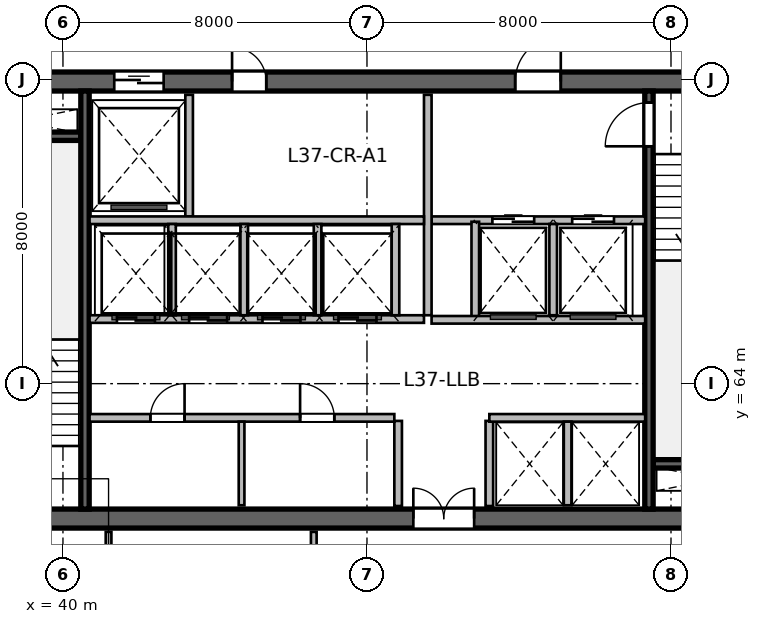
"""IFC4 building model, lengths in metres.
Left out: names, types, materials, properties, quantities, classifications, styles, units other than length and angle.
Written with IfcOpenShell. Run it as: python <this file> out.ifc"""

import sys

from ifc_helpers import new_model, si_unit, direction, frame, frame_2d, origin, place, context, subcontext, project, spatial, rectangle, extrude, source, transform, mapped, element, fill, save


model = new_model("IFC4")
c1 = context("Model", 3, precision=1e-05, world=origin(), true_north=direction((0.0, 1.0)))
c2 = subcontext(c1, "Body", "Model", "MODEL_VIEW")
j1 = project(units=[si_unit("LENGTHUNIT", "METRE"), si_unit("PLANEANGLEUNIT", "RADIAN")], contexts=[c1])
p1 = place(None, origin())
s1 = spatial("IfcSite", under=j1, at=p1, CompositionType="ELEMENT")
p2 = place(p1, origin())
s2 = spatial("IfcBuilding", under=s1, at=p2, CompositionType="ELEMENT")
p3 = place(p2, frame((0.0, 0.0, 154.5)))
s3 = spatial("IfcBuildingStorey", under=s2, at=p3, CompositionType="ELEMENT", Elevation=154.5)
m1 = source(origin(), c2, "Body", "SweptSolid", [
    extrude(rectangle(XDim=21.6, YDim=0.5, at=frame_2d((10.8, 0.0))), origin(), (0.0, 0.0, 1.0), 3.9),
])
p4 = place(p3, frame((37.2, 60.45, 0.0), z_axis=(0.0, 0.0, 1.0), x_axis=(1.0, 0.0, 0.0)))
e1 = element("IfcWall", 1, at=p4, inside=s3, PredefinedType="SHEAR", context=c2, shape_type="MappedRepresentation", body=[
    mapped(m1, transform((0.0, 0.0, 0.0), scale=1.0)),
])
p5 = place(p4, frame((1.1, 0.0, 0.0)))
e2 = element("IfcOpeningElement", 2, at=p5, cuts=e1, PredefinedType="OPENING", context=c2, shape_type="SweptSolid", body=[
    extrude(rectangle(XDim=1.15, YDim=2.15, at=frame_2d((0.575, 1.075))), frame((0.0, 0.26, 0.0), z_axis=(0.0, -1.0, 0.0), x_axis=(1.0, 0.0, 0.0)), (0.0, 0.0, 1.0), 0.52),
])
p6 = place(p4, frame((19.5, 0.0, 0.0)))
e3 = element("IfcOpeningElement", 3, at=p6, cuts=e1, PredefinedType="OPENING", context=c2, shape_type="SweptSolid", body=[
    extrude(rectangle(XDim=0.9, YDim=2.1, at=frame_2d((0.45, 1.05))), frame((0.0, 0.26, 0.0), z_axis=(0.0, -1.0, 0.0), x_axis=(1.0, 0.0, 0.0)), (0.0, 0.0, 1.0), 0.52),
])
p7 = place(p4, frame((12.02, 0.0, 0.0)))
e4 = element("IfcOpeningElement", 4, at=p7, cuts=e1, PredefinedType="OPENING", context=c2, shape_type="SweptSolid", body=[
    extrude(rectangle(XDim=1.6, YDim=2.15, at=frame_2d((0.8, 1.075))), frame((0.0, 0.26, 0.0), z_axis=(0.0, -1.0, 0.0), x_axis=(1.0, 0.0, 0.0)), (0.0, 0.0, 1.0), 0.52),
])
p8 = place(p3, frame((37.2, 71.95, 0.0), z_axis=(0.0, 0.0, 1.0), x_axis=(1.0, 0.0, 0.0)))
e5 = element("IfcWall", 5, at=p8, inside=s3, PredefinedType="SHEAR", context=c2, shape_type="MappedRepresentation", body=[
    mapped(m1, transform((0.0, 0.0, 0.0), scale=1.0)),
])
p9 = place(p8, frame((1.2, 0.0, 0.0)))
e6 = element("IfcOpeningElement", 6, at=p9, cuts=e5, PredefinedType="OPENING", context=c2, shape_type="SweptSolid", body=[
    extrude(rectangle(XDim=0.9, YDim=2.1, at=frame_2d((0.45, 1.05))), frame((0.0, 0.26, 0.0), z_axis=(0.0, -1.0, 0.0), x_axis=(1.0, 0.0, 0.0)), (0.0, 0.0, 1.0), 0.52),
])
p10 = place(p8, frame((14.7, 0.0, 0.0)))
e7 = element("IfcOpeningElement", 7, at=p10, cuts=e5, PredefinedType="OPENING", context=c2, shape_type="SweptSolid", body=[
    extrude(rectangle(XDim=1.2, YDim=2.15, at=frame_2d((0.6, 1.075))), frame((0.0, 0.26, 0.0), z_axis=(0.0, -1.0, 0.0), x_axis=(1.0, 0.0, 0.0)), (0.0, 0.0, 1.0), 0.52),
])
p11 = place(p8, frame((4.15, 0.0, 0.0)))
e8 = element("IfcOpeningElement", 8, at=p11, cuts=e5, PredefinedType="OPENING", context=c2, shape_type="SweptSolid", body=[
    extrude(rectangle(XDim=1.3, YDim=2.15, at=frame_2d((0.65, 1.075))), frame((0.0, 0.26, 0.0), z_axis=(0.0, -1.0, 0.0), x_axis=(1.0, 0.0, 0.0)), (0.0, 0.0, 1.0), 0.52),
])
p12 = place(p8, frame((7.25, 0.0, 0.0)))
e9 = element("IfcOpeningElement", 9, at=p12, cuts=e5, PredefinedType="OPENING", context=c2, shape_type="SweptSolid", body=[
    extrude(rectangle(XDim=0.9, YDim=2.1, at=frame_2d((0.45, 1.05))), frame((0.0, 0.26, 0.0), z_axis=(0.0, -1.0, 0.0), x_axis=(1.0, 0.0, 0.0)), (0.0, 0.0, 1.0), 0.52),
])
m2 = source(origin(), c2, "Body", "SweptSolid", [
    extrude(rectangle(XDim=3.27, YDim=0.22, at=frame_2d((1.635, 0.0))), origin(), (0.0, 0.0, 1.0), 3.9),
])
for number, where, z_axis, x_axis in (
    (10, (37.2, 70.51, 0.0), (0.0, 0.0, 1.0), (1.0, 0.0, 0.0)),
    (11, (55.53, 61.89, 0.0), (0.0, 0.0, 1.0), (1.0, 0.0, 0.0)),
):
    element("IfcWall", number, at=place(p3, frame(where, z_axis=z_axis, x_axis=x_axis)), inside=s3, PredefinedType="SHEAR", context=c2, shape_type="MappedRepresentation", body=[
        mapped(m2, transform((0.0, 0.0, 0.0), scale=1.0)),
    ])
m3 = source(origin(), c2, "Body", "SweptSolid", [
    extrude(rectangle(XDim=11.0, YDim=0.22, at=frame_2d((5.5, 0.0))), origin(), (0.0, 0.0, 1.0), 3.9),
])
p13 = place(p3, frame((40.58, 60.7, 0.0), z_axis=(0.0, 0.0, 1.0), x_axis=(0.0, 1.0, 0.0)))
e12 = element("IfcWall", 12, at=p13, inside=s3, PredefinedType="SHEAR", context=c2, shape_type="MappedRepresentation", body=[
    mapped(m3, transform((0.0, 0.0, 0.0), scale=1.0)),
])
p14 = place(p3, frame((55.42, 60.7, 0.0), z_axis=(0.0, 0.0, 1.0), x_axis=(0.0, 1.0, 0.0)))
e13 = element("IfcWall", 13, at=p14, inside=s3, PredefinedType="SHEAR", context=c2, shape_type="MappedRepresentation", body=[
    mapped(m3, transform((0.0, 0.0, 0.0), scale=1.0)),
])
p15 = place(p14, frame((9.545, 0.0, 0.0)))
e14 = element("IfcOpeningElement", 14, at=p15, cuts=e13, PredefinedType="OPENING", context=c2, shape_type="SweptSolid", body=[
    extrude(rectangle(XDim=1.15, YDim=2.15, at=frame_2d((0.575, 1.075))), frame((0.0, 0.12, 0.0), z_axis=(0.0, -1.0, 0.0), x_axis=(1.0, 0.0, 0.0)), (0.0, 0.0, 1.0), 0.24),
])
m4 = source(origin(), c2, "Body", "SweptSolid", [
    extrude(rectangle(XDim=2.24, YDim=0.2, at=frame_2d((1.12, 0.0))), origin(), (0.0, 0.0, 1.0), 3.65),
])
for number, where, z_axis, x_axis in (
    (15, (48.82, 60.78, 0.0), (0.0, 0.0, 1.0), (0.0, 1.0, 0.0)),
    (16, (51.22, 60.78, 0.0), (0.0, 0.0, 1.0), (0.0, 1.0, 0.0)),
):
    element("IfcWall", number, at=place(p3, frame(where, z_axis=z_axis, x_axis=x_axis)), inside=s3, PredefinedType="SOLIDWALL", context=c2, shape_type="MappedRepresentation", body=[
        mapped(m4, transform((0.0, 0.0, 0.0), scale=1.0)),
    ])
m5 = source(origin(), c2, "Body", "SweptSolid", [
    extrude(rectangle(XDim=5.62, YDim=0.2, at=frame_2d((2.81, 0.0))), origin(), (0.0, 0.0, 1.0), 3.65),
])
p16 = place(p3, frame((49.7, 68.3, 0.0), z_axis=(0.0, 0.0, 1.0), x_axis=(1.0, 0.0, 0.0)))
e17 = element("IfcWall", 17, at=p16, inside=s3, PredefinedType="SOLIDWALL", context=c2, shape_type="MappedRepresentation", body=[
    mapped(m5, transform((0.0, 0.0, 0.0), scale=1.0)),
])
p17 = place(p16, frame((1.6, 0.0, 0.0)))
e18 = element("IfcOpeningElement", 18, at=p17, cuts=e17, PredefinedType="OPENING", context=c2, shape_type="SweptSolid", body=[
    extrude(rectangle(XDim=1.1, YDim=2.15, at=frame_2d((0.55, 1.075))), frame((0.0, 0.11, 0.0), z_axis=(0.0, -1.0, 0.0), x_axis=(1.0, 0.0, 0.0)), (0.0, 0.0, 1.0), 0.22),
])
p18 = place(p16, frame((3.7, 0.0, 0.0)))
e19 = element("IfcOpeningElement", 19, at=p18, cuts=e17, PredefinedType="OPENING", context=c2, shape_type="SweptSolid", body=[
    extrude(rectangle(XDim=1.1, YDim=2.15, at=frame_2d((0.55, 1.075))), frame((0.0, 0.11, 0.0), z_axis=(0.0, -1.0, 0.0), x_axis=(1.0, 0.0, 0.0)), (0.0, 0.0, 1.0), 0.22),
])
m6 = source(origin(), c2, "Body", "SweptSolid", [
    extrude(rectangle(XDim=5.8, YDim=0.2, at=frame_2d((2.9, 0.0))), origin(), (0.0, 0.0, 1.0), 3.65),
])
p19 = place(p3, frame((49.6, 65.8, 0.0), z_axis=(0.0, 0.0, 1.0), x_axis=(0.0, 1.0, 0.0)))
e20 = element("IfcWall", 20, at=p19, inside=s3, PredefinedType="SOLIDWALL", context=c2, shape_type="MappedRepresentation", body=[
    mapped(m6, transform((0.0, 0.0, 0.0), scale=1.0)),
])
m7 = source(origin(), c2, "Body", "SweptSolid", [
    extrude(rectangle(XDim=2.58, YDim=0.2, at=frame_2d((1.29, 0.0))), origin(), (0.0, 0.0, 1.0), 3.65),
])
p20 = place(p3, frame((50.85, 65.68, 0.0), z_axis=(0.0, 0.0, 1.0), x_axis=(0.0, 1.0, 0.0)))
e21 = element("IfcWall", 21, at=p20, inside=s3, PredefinedType="SOLIDWALL", context=c2, shape_type="MappedRepresentation", body=[
    mapped(m7, transform((0.0, 0.0, 0.0), scale=1.0)),
])
m8 = source(origin(), c2, "Body", "SweptSolid", [
    extrude(rectangle(XDim=2.4, YDim=0.2, at=frame_2d((1.2, 0.0))), origin(), (0.0, 0.0, 1.0), 3.65),
])
p21 = place(p3, frame((52.9, 65.8, 0.0), z_axis=(0.0, 0.0, 1.0), x_axis=(0.0, 1.0, 0.0)))
e22 = element("IfcWall", 22, at=p21, inside=s3, PredefinedType="SOLIDWALL", context=c2, shape_type="MappedRepresentation", body=[
    mapped(m8, transform((0.0, 0.0, 0.0), scale=1.0)),
])
p22 = place(p3, frame((49.7, 65.68, 0.0), z_axis=(0.0, 0.0, 1.0), x_axis=(1.0, 0.0, 0.0)))
e23 = element("IfcWall", 23, at=p22, inside=s3, PredefinedType="SOLIDWALL", context=c2, shape_type="MappedRepresentation", body=[
    mapped(m5, transform((0.0, 0.0, 0.0), scale=1.0)),
])
m9 = source(origin(), c2, "Body", "SweptSolid", [
    extrude(rectangle(XDim=3.2, YDim=0.2, at=frame_2d((1.6, 0.0))), origin(), (0.0, 0.0, 1.0), 3.65),
])
p23 = place(p3, frame((43.32, 68.4, 0.0), z_axis=(0.0, 0.0, 1.0), x_axis=(0.0, 1.0, 0.0)))
e24 = element("IfcWall", 24, at=p23, inside=s3, PredefinedType="SOLIDWALL", context=c2, shape_type="MappedRepresentation", body=[
    mapped(m9, transform((0.0, 0.0, 0.0), scale=1.0)),
])
m10 = source(origin(), c2, "Body", "SweptSolid", [
    extrude(rectangle(XDim=8.8, YDim=0.2, at=frame_2d((4.4, 0.0))), origin(), (0.0, 0.0, 1.0), 3.65),
])
p24 = place(p3, frame((40.7, 68.3, 0.0), z_axis=(0.0, 0.0, 1.0), x_axis=(1.0, 0.0, 0.0)))
e25 = element("IfcWall", 25, at=p24, inside=s3, PredefinedType="SOLIDWALL", context=c2, shape_type="MappedRepresentation", body=[
    mapped(m10, transform((0.0, 0.0, 0.0), scale=1.0)),
])
m11 = source(origin(), c2, "Body", "SweptSolid", [
    extrude(rectangle(XDim=8.02, YDim=0.2, at=frame_2d((4.01, 0.0))), origin(), (0.0, 0.0, 1.0), 3.65),
])
p25 = place(p3, frame((40.7, 63.1, 0.0), z_axis=(0.0, 0.0, 1.0), x_axis=(1.0, 0.0, 0.0)))
e26 = element("IfcWall", 26, at=p25, inside=s3, PredefinedType="SOLIDWALL", context=c2, shape_type="MappedRepresentation", body=[
    mapped(m11, transform((0.0, 0.0, 0.0), scale=1.0)),
])
p26 = place(p25, frame((1.6, 0.0, 0.0)))
e27 = element("IfcOpeningElement", 27, at=p26, cuts=e26, PredefinedType="OPENING", context=c2, shape_type="SweptSolid", body=[
    extrude(rectangle(XDim=0.9, YDim=2.1, at=frame_2d((0.45, 1.05))), frame((0.0, 0.11, 0.0), z_axis=(0.0, -1.0, 0.0), x_axis=(1.0, 0.0, 0.0)), (0.0, 0.0, 1.0), 0.22),
])
p27 = place(p25, frame((5.54, 0.0, 0.0)))
e28 = element("IfcOpeningElement", 28, at=p27, cuts=e26, PredefinedType="OPENING", context=c2, shape_type="SweptSolid", body=[
    extrude(rectangle(XDim=0.9, YDim=2.1, at=frame_2d((0.45, 1.05))), frame((0.0, 0.11, 0.0), z_axis=(0.0, -1.0, 0.0), x_axis=(1.0, 0.0, 0.0)), (0.0, 0.0, 1.0), 0.22),
])
m12 = source(origin(), c2, "Body", "SweptSolid", [
    extrude(rectangle(XDim=4.1, YDim=0.2, at=frame_2d((2.05, 0.0))), origin(), (0.0, 0.0, 1.0), 3.65),
])
p28 = place(p3, frame((51.22, 63.1, 0.0), z_axis=(0.0, 0.0, 1.0), x_axis=(1.0, 0.0, 0.0)))
e29 = element("IfcWall", 29, at=p28, inside=s3, PredefinedType="SOLIDWALL", context=c2, shape_type="MappedRepresentation", body=[
    mapped(m12, transform((0.0, 0.0, 0.0), scale=1.0)),
])
m13 = source(origin(), c2, "Body", "SweptSolid", [
    extrude(rectangle(XDim=2.2, YDim=0.15, at=frame_2d((1.1, 0.0))), origin(), (0.0, 0.0, 1.0), 3.65),
])
p29 = place(p3, frame((44.7, 60.8, 0.0), z_axis=(0.0, 0.0, 1.0), x_axis=(0.0, 1.0, 0.0)))
e30 = element("IfcWall", 30, at=p29, inside=s3, PredefinedType="PARTITIONING", context=c2, shape_type="MappedRepresentation", body=[
    mapped(m13, transform((0.0, 0.0, 0.0), scale=1.0)),
])
m14 = source(origin(), c2, "Body", "SweptSolid", [
    extrude(rectangle(XDim=2.2, YDim=0.2, at=frame_2d((1.1, 0.0))), origin(), (0.0, 0.0, 1.0), 3.65),
])
p30 = place(p3, frame((53.28, 60.8, 0.0), z_axis=(0.0, 0.0, 1.0), x_axis=(0.0, 1.0, 0.0)))
e31 = element("IfcWall", 31, at=p30, inside=s3, PredefinedType="SOLIDWALL", context=c2, shape_type="MappedRepresentation", body=[
    mapped(m14, transform((0.0, 0.0, 0.0), scale=1.0)),
])
p31 = place(p3, frame((40.7, 65.7, 0.0), z_axis=(0.0, 0.0, 1.0), x_axis=(1.0, 0.0, 0.0)))
e32 = element("IfcWall", 32, at=p31, inside=s3, PredefinedType="SOLIDWALL", context=c2, shape_type="MappedRepresentation", body=[
    mapped(m10, transform((0.0, 0.0, 0.0), scale=1.0)),
])
p32 = place(p31, frame((0.72, 0.0, 0.0)))
e33 = element("IfcOpeningElement", 33, at=p32, cuts=e32, PredefinedType="OPENING", context=c2, shape_type="SweptSolid", body=[
    extrude(rectangle(XDim=1.0, YDim=2.15, at=frame_2d((0.5, 1.075))), frame((0.0, 0.11, 0.0), z_axis=(0.0, -1.0, 0.0), x_axis=(1.0, 0.0, 0.0)), (0.0, 0.0, 1.0), 0.22),
])
p33 = place(p31, frame((2.62, 0.0, 0.0)))
e34 = element("IfcOpeningElement", 34, at=p33, cuts=e32, PredefinedType="OPENING", context=c2, shape_type="SweptSolid", body=[
    extrude(rectangle(XDim=1.0, YDim=2.15, at=frame_2d((0.5, 1.075))), frame((0.0, 0.11, 0.0), z_axis=(0.0, -1.0, 0.0), x_axis=(1.0, 0.0, 0.0)), (0.0, 0.0, 1.0), 0.22),
])
p34 = place(p31, frame((4.55, 0.0, 0.0)))
e35 = element("IfcOpeningElement", 35, at=p34, cuts=e32, PredefinedType="OPENING", context=c2, shape_type="SweptSolid", body=[
    extrude(rectangle(XDim=1.0, YDim=2.15, at=frame_2d((0.5, 1.075))), frame((0.0, 0.11, 0.0), z_axis=(0.0, -1.0, 0.0), x_axis=(1.0, 0.0, 0.0)), (0.0, 0.0, 1.0), 0.22),
])
p35 = place(p31, frame((6.55, 0.0, 0.0)))
e36 = element("IfcOpeningElement", 36, at=p35, cuts=e32, PredefinedType="OPENING", context=c2, shape_type="SweptSolid", body=[
    extrude(rectangle(XDim=1.0, YDim=2.15, at=frame_2d((0.5, 1.075))), frame((0.0, 0.11, 0.0), z_axis=(0.0, -1.0, 0.0), x_axis=(1.0, 0.0, 0.0)), (0.0, 0.0, 1.0), 0.22),
])
for number, where, z_axis, x_axis in (
    (37, (48.75, 65.8, 0.0), (0.0, 0.0, 1.0), (0.0, 1.0, 0.0)),
    (38, (42.87, 65.8, 0.0), (0.0, 0.0, 1.0), (0.0, 1.0, 0.0)),
    (39, (44.77, 65.8, 0.0), (0.0, 0.0, 1.0), (0.0, 1.0, 0.0)),
    (40, (46.7, 65.8, 0.0), (0.0, 0.0, 1.0), (0.0, 1.0, 0.0)),
):
    element("IfcWall", number, at=place(p3, frame(where, z_axis=z_axis, x_axis=x_axis)), inside=s3, PredefinedType="SOLIDWALL", context=c2, shape_type="MappedRepresentation", body=[
        mapped(m8, transform((0.0, 0.0, 0.0), scale=1.0)),
    ])
m15 = source(origin(), c2, "Body", "SweptSolid", [
    extrude(rectangle(XDim=2.033, YDim=0.15, at=frame_2d((1.016, 0.0))), origin(), (0.0, 0.0, 1.0), 3.65),
])
p36 = place(p3, frame((41.2, 58.067, 0.0), z_axis=(0.0, 0.0, 1.0), x_axis=(0.0, 1.0, 0.0)))
e41 = element("IfcWall", 41, at=p36, inside=s3, PredefinedType="PARTITIONING", context=c2, shape_type="MappedRepresentation", body=[
    mapped(m15, transform((0.0, 0.0, 0.0), scale=1.0)),
])
p37 = place(p36, frame((0.591, 0.0, 0.0)))
e42 = element("IfcOpeningElement", 42, at=p37, cuts=e41, PredefinedType="OPENING", context=c2, shape_type="SweptSolid", body=[
    extrude(rectangle(XDim=0.85, YDim=2.1, at=frame_2d((0.425, 1.05))), frame((0.0, 0.085, 0.0), z_axis=(0.0, -1.0, 0.0), x_axis=(1.0, 0.0, 0.0)), (0.0, 0.0, 1.0), 0.17),
])
p38 = place(p3, frame((46.6, 58.067, 0.0), z_axis=(0.0, 0.0, 1.0), x_axis=(0.0, 1.0, 0.0)))
e43 = element("IfcWall", 43, at=p38, inside=s3, PredefinedType="PARTITIONING", context=c2, shape_type="MappedRepresentation", body=[
    mapped(m15, transform((0.0, 0.0, 0.0), scale=1.0)),
])
m16 = source(origin(), c2, "Body", "SweptSolid", [
    extrude(rectangle(XDim=1.15, YDim=2.15, at=frame_2d((0.575, 1.075))), frame((0.0, 0.025, 0.0), z_axis=(0.0, -1.0, 0.0), x_axis=(1.0, 0.0, 0.0)), (0.0, 0.0, 1.0), 0.05),
])
p39 = place(p15, origin())
e44 = element("IfcDoor", 44, at=p39, inside=s3, OperationType="SINGLE_SWING_LEFT", PredefinedType="DOOR", context=c2, shape_type="MappedRepresentation", body=[
    mapped(m16, transform((0.0, 0.0, 0.0), scale=1.0)),
])
fill(e14, e44)
m17 = source(origin(), c2, "Body", "SweptSolid", [
    extrude(rectangle(XDim=1.6, YDim=2.15, at=frame_2d((0.8, 1.075))), frame((0.0, 0.025, 0.0), z_axis=(0.0, -1.0, 0.0), x_axis=(1.0, 0.0, 0.0)), (0.0, 0.0, 1.0), 0.05),
])
p40 = place(p7, origin())
e45 = element("IfcDoor", 45, at=p40, inside=s3, OperationType="DOUBLE_DOOR_SINGLE_SWING", PredefinedType="DOOR", context=c2, shape_type="MappedRepresentation", body=[
    mapped(m17, transform((0.0, 0.0, 0.0), scale=1.0)),
])
fill(e4, e45)
m18 = source(origin(), c2, "Body", "SweptSolid", [
    extrude(rectangle(XDim=1.2, YDim=2.15, at=frame_2d((0.6, 1.075))), frame((0.0, 0.025, 0.0), z_axis=(0.0, -1.0, 0.0), x_axis=(1.0, 0.0, 0.0)), (0.0, 0.0, 1.0), 0.05),
])
p41 = place(p10, origin())
e46 = element("IfcDoor", 46, at=p41, inside=s3, OperationType="SINGLE_SWING_RIGHT", PredefinedType="DOOR", context=c2, shape_type="MappedRepresentation", body=[
    mapped(m18, transform((0.0, 0.0, 0.0), scale=1.0)),
])
fill(e7, e46)
m19 = source(origin(), c2, "Body", "SweptSolid", [
    extrude(rectangle(XDim=1.1, YDim=2.15, at=frame_2d((0.55, 1.075))), frame((0.0, 0.025, 0.0), z_axis=(0.0, -1.0, 0.0), x_axis=(1.0, 0.0, 0.0)), (0.0, 0.0, 1.0), 0.05),
])
p42 = place(p17, origin())
e47 = element("IfcDoor", 47, at=p42, inside=s3, OperationType="DOUBLE_DOOR_SLIDING", PredefinedType="DOOR", context=c2, shape_type="MappedRepresentation", body=[
    mapped(m19, transform((0.0, 0.0, 0.0), scale=1.0)),
])
fill(e18, e47)
p43 = place(p18, origin())
e48 = element("IfcDoor", 48, at=p43, inside=s3, OperationType="DOUBLE_DOOR_SLIDING", PredefinedType="DOOR", context=c2, shape_type="MappedRepresentation", body=[
    mapped(m19, transform((0.0, 0.0, 0.0), scale=1.0)),
])
fill(e19, e48)
m20 = source(origin(), c2, "Body", "SweptSolid", [
    extrude(rectangle(XDim=1.3, YDim=2.15, at=frame_2d((0.65, 1.075))), frame((0.0, 0.025, 0.0), z_axis=(0.0, -1.0, 0.0), x_axis=(1.0, 0.0, 0.0)), (0.0, 0.0, 1.0), 0.05),
])
p44 = place(p11, origin())
e49 = element("IfcDoor", 49, at=p44, inside=s3, OperationType="DOUBLE_DOOR_SLIDING", PredefinedType="DOOR", context=c2, shape_type="MappedRepresentation", body=[
    mapped(m20, transform((0.0, 0.0, 0.0), scale=1.0)),
])
fill(e8, e49)
m21 = source(origin(), c2, "Body", "SweptSolid", [
    extrude(rectangle(XDim=0.9, YDim=2.1, at=frame_2d((0.45, 1.05))), frame((0.0, 0.025, 0.0), z_axis=(0.0, -1.0, 0.0), x_axis=(1.0, 0.0, 0.0)), (0.0, 0.0, 1.0), 0.05),
])
p45 = place(p12, origin())
e50 = element("IfcDoor", 50, at=p45, inside=s3, OperationType="SINGLE_SWING_LEFT", PredefinedType="DOOR", context=c2, shape_type="MappedRepresentation", body=[
    mapped(m21, transform((0.0, 0.0, 0.0), scale=1.0)),
])
fill(e9, e50)
p46 = place(p26, origin())
e51 = element("IfcDoor", 51, at=p46, inside=s3, OperationType="SINGLE_SWING_RIGHT", PredefinedType="DOOR", context=c2, shape_type="MappedRepresentation", body=[
    mapped(m21, transform((0.0, 0.0, 0.0), scale=1.0)),
])
fill(e27, e51)
p47 = place(p27, origin())
e52 = element("IfcDoor", 52, at=p47, inside=s3, OperationType="SINGLE_SWING_LEFT", PredefinedType="DOOR", context=c2, shape_type="MappedRepresentation", body=[
    mapped(m21, transform((0.0, 0.0, 0.0), scale=1.0)),
])
fill(e28, e52)
m22 = source(origin(), c2, "Body", "SweptSolid", [
    extrude(rectangle(XDim=1.0, YDim=2.15, at=frame_2d((0.5, 1.075))), frame((0.0, 0.025, 0.0), z_axis=(0.0, -1.0, 0.0), x_axis=(1.0, 0.0, 0.0)), (0.0, 0.0, 1.0), 0.05),
])
p48 = place(p32, origin())
e53 = element("IfcDoor", 53, at=p48, inside=s3, OperationType="DOUBLE_DOOR_SLIDING", PredefinedType="DOOR", context=c2, shape_type="MappedRepresentation", body=[
    mapped(m22, transform((0.0, 0.0, 0.0), scale=1.0)),
])
fill(e33, e53)
p49 = place(p33, origin())
e54 = element("IfcDoor", 54, at=p49, inside=s3, OperationType="DOUBLE_DOOR_SLIDING", PredefinedType="DOOR", context=c2, shape_type="MappedRepresentation", body=[
    mapped(m22, transform((0.0, 0.0, 0.0), scale=1.0)),
])
fill(e34, e54)
p50 = place(p34, origin())
e55 = element("IfcDoor", 55, at=p50, inside=s3, OperationType="DOUBLE_DOOR_SLIDING", PredefinedType="DOOR", context=c2, shape_type="MappedRepresentation", body=[
    mapped(m22, transform((0.0, 0.0, 0.0), scale=1.0)),
])
fill(e35, e55)
p51 = place(p35, origin())
e56 = element("IfcDoor", 56, at=p51, inside=s3, OperationType="DOUBLE_DOOR_SLIDING", PredefinedType="DOOR", context=c2, shape_type="MappedRepresentation", body=[
    mapped(m22, transform((0.0, 0.0, 0.0), scale=1.0)),
])
fill(e36, e56)
save(model, sys.argv[1])
